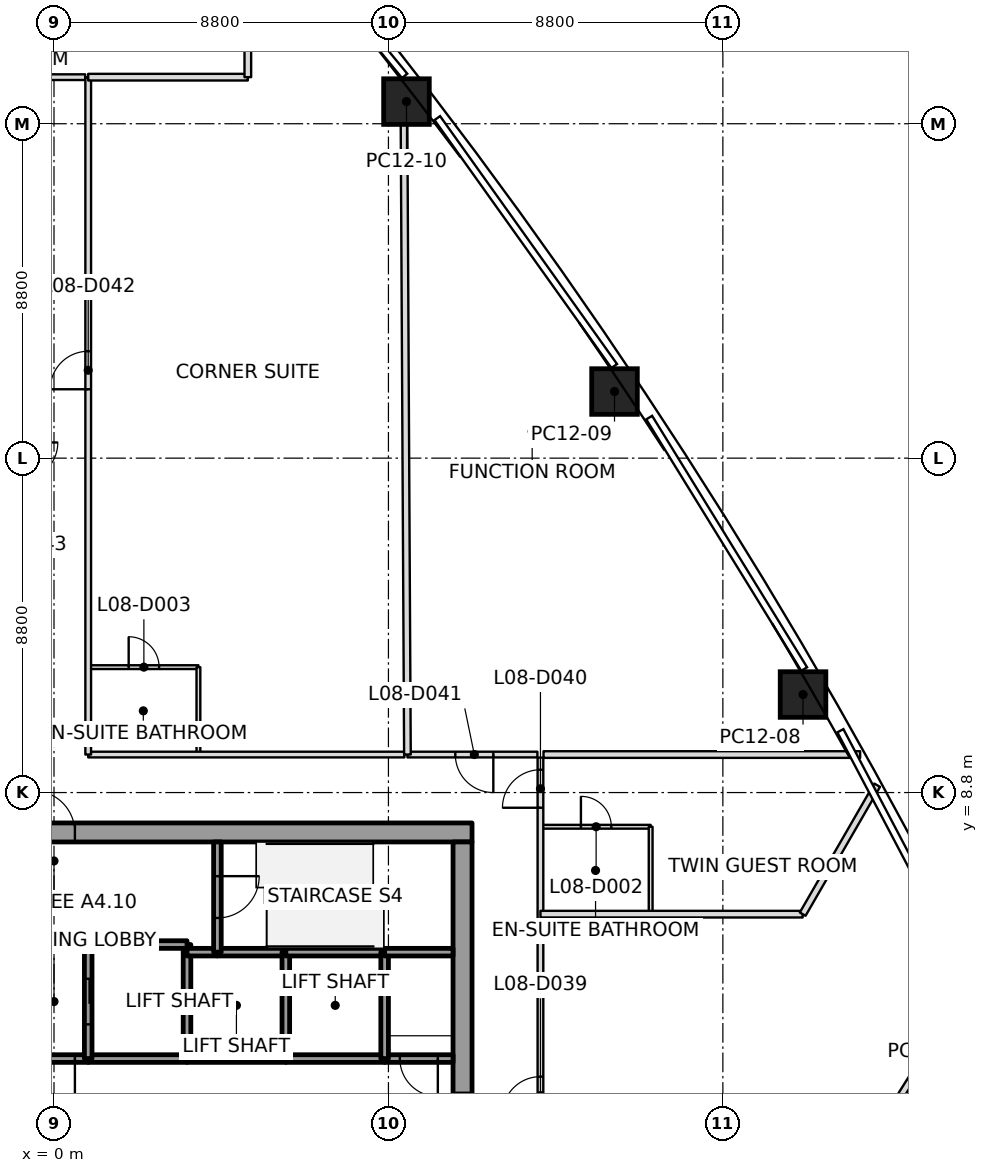
"""IFC4 building model, lengths in metres.
Left out: names, types, materials, properties, quantities, classifications, styles, units other than length and angle.
Written with IfcOpenShell. Run it as: python <this file> out.ifc"""

import sys

from ifc_helpers import new_model, si_unit, direction, frame, frame_2d, origin, origin_2d, place, context, subcontext, project, spatial, rectangle, extrude, element, fill, save


model = new_model("IFC4")
c1 = context("Model", 3, precision=1e-05, world=origin(), true_north=direction((0.0, 1.0)))
c2 = subcontext(c1, "Body", "Model", "MODEL_VIEW")
j1 = project(units=[si_unit("LENGTHUNIT", "METRE"), si_unit("PLANEANGLEUNIT", "RADIAN")], contexts=[c1])
p1 = place(None, origin())
s1 = spatial("IfcSite", under=j1, at=p1, CompositionType="ELEMENT")
p2 = place(p1, origin())
s2 = spatial("IfcBuilding", under=s1, at=p2, CompositionType="ELEMENT")
p3 = place(p2, frame((0.0, 0.0, 51.7)))
s3 = spatial("IfcBuildingStorey", under=s2, at=p3, CompositionType="ELEMENT", Elevation=51.7)
p4 = place(p3, frame((19.709, 11.379, 0.0), z_axis=(-0.010688725148, -0.006202099777, 0.999923639641), x_axis=(-0.499971436973, 0.8660418936, 2.7223042e-05)))
e1 = element("IfcColumn", 1, at=p4, inside=s3, PredefinedType="COLUMN", context=c2, shape_type="SweptSolid", body=[
    extrude(rectangle(XDim=1.2, YDim=1.2, at=origin_2d()), origin(), (0.0, 0.0, 1.0), 3.7),
])
p5 = place(p3, frame((14.749, 19.353, 0.0), z_axis=(-0.005674011074, -0.014448935178, 0.999879509676), x_axis=(-0.555902266829, 0.831200472954, 0.008856833298)))
e2 = element("IfcColumn", 2, at=p5, inside=s3, PredefinedType="COLUMN", context=c2, shape_type="SweptSolid", body=[
    extrude(rectangle(XDim=1.2, YDim=1.2, at=origin_2d()), origin(), (0.0, 0.0, 1.0), 3.7),
])
p6 = place(p3, frame((9.275, 26.982, 0.0), z_axis=(-0.000197904668, -0.022429195703, 0.999748414359), x_axis=(-0.609410619904, 0.792658016882, 0.017662520216)))
e3 = element("IfcColumn", 3, at=p6, inside=s3, PredefinedType="COLUMN", context=c2, shape_type="SweptSolid", body=[
    extrude(rectangle(XDim=1.2, YDim=1.2, at=origin_2d()), origin(), (0.0, 0.0, 1.0), 3.701),
])
p7 = place(p3, frame((-11.0, 7.75, 0.0), z_axis=(0.0, 0.0, 1.0), x_axis=(1.0, 0.0, 0.0)))
e4 = element("IfcWall", 4, at=p7, inside=s3, PredefinedType="SHEAR", context=c2, shape_type="SweptSolid", body=[
    extrude(rectangle(XDim=22.0, YDim=0.5, at=frame_2d((11.0, 0.0))), origin(), (0.0, 0.0, 1.0), 3.7),
])
p8 = place(p7, frame((10.45, 0.0, 0.0)))
e5 = element("IfcOpeningElement", 5, at=p8, cuts=e4, PredefinedType="OPENING", context=c2, shape_type="SweptSolid", body=[
    extrude(rectangle(XDim=1.1, YDim=2.1, at=frame_2d((0.55, 1.05))), frame((0.0, 0.25, 0.0), z_axis=(0.0, -1.0, 0.0), x_axis=(1.0, 0.0, 0.0)), (0.0, 0.0, 1.0), 0.5),
])
p9 = place(p3, frame((10.75, -7.5, 0.0), z_axis=(0.0, 0.0, 1.0), x_axis=(0.0, 1.0, 0.0)))
e6 = element("IfcWall", 6, at=p9, inside=s3, PredefinedType="SHEAR", context=c2, shape_type="SweptSolid", body=[
    extrude(rectangle(XDim=15.0, YDim=0.5, at=frame_2d((7.5, 0.0))), origin(), (0.0, 0.0, 1.0), 3.7),
])
p10 = place(p9, frame((6.6, 0.0, 0.0)))
e7 = element("IfcOpeningElement", 7, at=p10, cuts=e6, PredefinedType="OPENING", context=c2, shape_type="SweptSolid", body=[
    extrude(rectangle(XDim=1.8, YDim=2.1, at=frame_2d((0.9, 1.05))), frame((0.0, 0.25, 0.0), z_axis=(0.0, -1.0, 0.0), x_axis=(1.0, 0.0, 0.0)), (0.0, 0.0, 1.0), 0.5),
])
p11 = place(p3, frame((0.9, 1.8, 0.0), z_axis=(0.0, 0.0, 1.0), x_axis=(-1.0, 0.0, 0.0)))
e8 = element("IfcWall", 8, at=p11, inside=s3, PredefinedType="SOLIDWALL", context=c2, shape_type="SweptSolid", body=[
    extrude(rectangle(XDim=1.8, YDim=0.2, at=frame_2d((0.9, 0.0))), origin(), (0.0, 0.0, 1.0), 3.55),
])
p12 = place(p11, frame((0.35, 0.0, 0.0)))
e9 = element("IfcOpeningElement", 9, at=p12, cuts=e8, PredefinedType="OPENING", context=c2, shape_type="SweptSolid", body=[
    extrude(rectangle(XDim=1.1, YDim=2.1, at=frame_2d((0.55, 1.05))), frame((0.0, 0.1, 0.0), z_axis=(0.0, -1.0, 0.0), x_axis=(1.0, 0.0, 0.0)), (0.0, 0.0, 1.0), 0.2),
])
p13 = place(p3, frame((3.5, 1.8, 0.0), z_axis=(0.0, 0.0, 1.0), x_axis=(-1.0, 0.0, 0.0)))
e10 = element("IfcWall", 10, at=p13, inside=s3, PredefinedType="SOLIDWALL", context=c2, shape_type="SweptSolid", body=[
    extrude(rectangle(XDim=2.6, YDim=0.2, at=frame_2d((1.3, 0.0))), origin(), (0.0, 0.0, 1.0), 3.55),
])
p14 = place(p3, frame((3.5, 4.6, 0.0), z_axis=(0.0, 0.0, 1.0), x_axis=(0.0, 1.0, 0.0)))
e11 = element("IfcWall", 11, at=p14, inside=s3, PredefinedType="SOLIDWALL", context=c2, shape_type="SweptSolid", body=[
    extrude(rectangle(XDim=0.2, YDim=0.2, at=frame_2d((0.1, 0.0))), origin(), (0.0, 0.0, 1.0), 3.55),
])
p15 = place(p3, frame((3.5, 4.8, 0.0), z_axis=(0.0, 0.0, 1.0), x_axis=(-1.0, 0.0, 0.0)))
e12 = element("IfcWall", 12, at=p15, inside=s3, PredefinedType="SOLIDWALL", context=c2, shape_type="SweptSolid", body=[
    extrude(rectangle(XDim=2.6, YDim=0.2, at=frame_2d((1.3, 0.0))), origin(), (0.0, 0.0, 1.0), 3.55),
])
p16 = place(p3, frame((0.9, 4.8, 0.0), z_axis=(0.0, 0.0, 1.0), x_axis=(0.0, -1.0, 0.0)))
e13 = element("IfcWall", 13, at=p16, inside=s3, PredefinedType="SOLIDWALL", context=c2, shape_type="SweptSolid", body=[
    extrude(rectangle(XDim=3.0, YDim=0.2, at=frame_2d((1.5, 0.0))), origin(), (0.0, 0.0, 1.0), 3.55),
])
p17 = place(p16, frame((0.9, 0.0, 0.0)))
e14 = element("IfcOpeningElement", 14, at=p17, cuts=e13, PredefinedType="OPENING", context=c2, shape_type="SweptSolid", body=[
    extrude(rectangle(XDim=1.2, YDim=2.1, at=frame_2d((0.6, 1.05))), frame((0.0, 0.1, 0.0), z_axis=(0.0, -1.0, 0.0), x_axis=(1.0, 0.0, 0.0)), (0.0, 0.0, 1.0), 0.2),
])
p18 = place(p3, frame((6.1, 1.8, 0.0), z_axis=(0.0, 0.0, 1.0), x_axis=(-1.0, 0.0, 0.0)))
e15 = element("IfcWall", 15, at=p18, inside=s3, PredefinedType="SOLIDWALL", context=c2, shape_type="SweptSolid", body=[
    extrude(rectangle(XDim=2.6, YDim=0.2, at=frame_2d((1.3, 0.0))), origin(), (0.0, 0.0, 1.0), 3.55),
])
p19 = place(p3, frame((3.5, 1.8, 0.0), z_axis=(0.0, 0.0, 1.0), x_axis=(0.0, 1.0, 0.0)))
e16 = element("IfcWall", 16, at=p19, inside=s3, PredefinedType="SOLIDWALL", context=c2, shape_type="SweptSolid", body=[
    extrude(rectangle(XDim=2.8, YDim=0.2, at=frame_2d((1.4, 0.0))), origin(), (0.0, 0.0, 1.0), 3.55),
])
p20 = place(p3, frame((4.3, 4.6, 0.0), z_axis=(0.0, 0.0, 1.0), x_axis=(-1.0, 0.0, 0.0)))
e17 = element("IfcWall", 17, at=p20, inside=s3, PredefinedType="SOLIDWALL", context=c2, shape_type="SweptSolid", body=[
    extrude(rectangle(XDim=0.8, YDim=0.2, at=frame_2d((0.4, 0.0))), origin(), (0.0, 0.0, 1.0), 3.55),
])
p21 = place(p3, frame((6.1, 4.6, 0.0), z_axis=(0.0, 0.0, 1.0), x_axis=(-1.0, 0.0, 0.0)))
e18 = element("IfcWall", 18, at=p21, inside=s3, PredefinedType="SOLIDWALL", context=c2, shape_type="SweptSolid", body=[
    extrude(rectangle(XDim=1.8, YDim=0.2, at=frame_2d((0.9, 0.0))), origin(), (0.0, 0.0, 1.0), 3.55),
])
p22 = place(p3, frame((4.3, 7.5, 0.0), z_axis=(0.0, 0.0, 1.0), x_axis=(0.0, -1.0, 0.0)))
e19 = element("IfcWall", 19, at=p22, inside=s3, PredefinedType="SOLIDWALL", context=c2, shape_type="SweptSolid", body=[
    extrude(rectangle(XDim=2.9, YDim=0.2, at=frame_2d((1.45, 0.0))), origin(), (0.0, 0.0, 1.0), 3.55),
])
p23 = place(p22, frame((0.9, 0.0, 0.0)))
e20 = element("IfcOpeningElement", 20, at=p23, cuts=e19, PredefinedType="OPENING", context=c2, shape_type="SweptSolid", body=[
    extrude(rectangle(XDim=1.1, YDim=2.1, at=frame_2d((0.55, 1.05))), frame((0.0, 0.1, 0.0), z_axis=(0.0, -1.0, 0.0), x_axis=(1.0, 0.0, 0.0)), (0.0, 0.0, 1.0), 0.2),
])
p24 = place(p3, frame((8.7, 1.8, 0.0), z_axis=(0.0, 0.0, 1.0), x_axis=(-1.0, 0.0, 0.0)))
e21 = element("IfcWall", 21, at=p24, inside=s3, PredefinedType="SOLIDWALL", context=c2, shape_type="SweptSolid", body=[
    extrude(rectangle(XDim=2.6, YDim=0.2, at=frame_2d((1.3, 0.0))), origin(), (0.0, 0.0, 1.0), 3.55),
])
p25 = place(p3, frame((6.1, 1.8, 0.0), z_axis=(0.0, 0.0, 1.0), x_axis=(0.0, 1.0, 0.0)))
e22 = element("IfcWall", 22, at=p25, inside=s3, PredefinedType="SOLIDWALL", context=c2, shape_type="SweptSolid", body=[
    extrude(rectangle(XDim=2.8, YDim=0.2, at=frame_2d((1.4, 0.0))), origin(), (0.0, 0.0, 1.0), 3.55),
])
p26 = place(p3, frame((8.7, 4.6, 0.0), z_axis=(0.0, 0.0, 1.0), x_axis=(-1.0, 0.0, 0.0)))
e23 = element("IfcWall", 23, at=p26, inside=s3, PredefinedType="SOLIDWALL", context=c2, shape_type="SweptSolid", body=[
    extrude(rectangle(XDim=2.6, YDim=0.2, at=frame_2d((1.3, 0.0))), origin(), (0.0, 0.0, 1.0), 3.55),
])
p27 = place(p3, frame((10.5, 1.8, 0.0), z_axis=(0.0, 0.0, 1.0), x_axis=(-1.0, 0.0, 0.0)))
e24 = element("IfcWall", 24, at=p27, inside=s3, PredefinedType="SOLIDWALL", context=c2, shape_type="SweptSolid", body=[
    extrude(rectangle(XDim=1.8, YDim=0.2, at=frame_2d((0.9, 0.0))), origin(), (0.0, 0.0, 1.0), 3.55),
])
p28 = place(p27, frame((0.4, 0.0, 0.0)))
e25 = element("IfcOpeningElement", 25, at=p28, cuts=e24, PredefinedType="OPENING", context=c2, shape_type="SweptSolid", body=[
    extrude(rectangle(XDim=1.0, YDim=2.1, at=frame_2d((0.5, 1.05))), frame((0.0, 0.1, 0.0), z_axis=(0.0, -1.0, 0.0), x_axis=(1.0, 0.0, 0.0)), (0.0, 0.0, 1.0), 0.2),
])
p29 = place(p3, frame((8.7, 4.6, 0.0), z_axis=(0.0, 0.0, 1.0), x_axis=(0.0, -1.0, 0.0)))
e26 = element("IfcWall", 26, at=p29, inside=s3, PredefinedType="SOLIDWALL", context=c2, shape_type="SweptSolid", body=[
    extrude(rectangle(XDim=2.8, YDim=0.2, at=frame_2d((1.4, 0.0))), origin(), (0.0, 0.0, 1.0), 3.55),
])
p30 = place(p3, frame((10.5, 4.6, 0.0), z_axis=(0.0, 0.0, 1.0), x_axis=(-1.0, 0.0, 0.0)))
e27 = element("IfcWall", 27, at=p30, inside=s3, PredefinedType="SOLIDWALL", context=c2, shape_type="SweptSolid", body=[
    extrude(rectangle(XDim=1.8, YDim=0.2, at=frame_2d((0.9, 0.0))), origin(), (0.0, 0.0, 1.0), 3.55),
])
p31 = place(p3, frame((0.9, 27.625, 0.0), z_axis=(0.0, 0.0, 1.0), x_axis=(1.0, 0.0, 0.0)))
e28 = element("IfcWall", 28, at=p31, inside=s3, PredefinedType="PARTITIONING", context=c2, shape_type="SweptSolid", body=[
    extrude(rectangle(XDim=4.2, YDim=0.175, at=frame_2d((2.1, 0.0))), origin(), (0.0, 0.0, 1.0), 3.15),
])
p32 = place(p3, frame((5.1, 27.625, 0.0), z_axis=(0.0, 0.0, 1.0), x_axis=(0.0, 1.0, 0.0)))
e29 = element("IfcWall", 29, at=p32, inside=s3, PredefinedType="PARTITIONING", context=c2, shape_type="SweptSolid", body=[
    extrude(rectangle(XDim=5.351, YDim=0.175, at=frame_2d((2.675, 0.0))), origin(), (0.0, 0.0, 1.0), 2.934),
])
p33 = place(p3, frame((9.204, 27.586, 0.0), z_axis=(0.0, 0.0, 1.0), x_axis=(0.00539449399, -0.999985449611, 0.0)))
e30 = element("IfcWall", 30, at=p33, inside=s3, PredefinedType="PARTITIONING", context=c2, shape_type="SweptSolid", body=[
    extrude(rectangle(XDim=17.786, YDim=0.175, at=frame_2d((8.893, 0.0))), origin(), (0.0, 0.0, 1.0), 2.947),
])
p34 = place(p3, frame((12.8, 5.6, 0.0), z_axis=(0.0, 0.0, 1.0), x_axis=(1.0, 0.0, 0.0)))
e31 = element("IfcWall", 31, at=p34, inside=s3, PredefinedType="PARTITIONING", context=c2, shape_type="SweptSolid", body=[
    extrude(rectangle(XDim=6.9, YDim=0.175, at=frame_2d((3.45, 0.0))), origin(), (0.0, 0.0, 1.0), 3.093),
])
p35 = place(p3, frame((19.7, 5.6, 0.0), z_axis=(0.0, 0.0, 1.0), x_axis=(0.500038841519, 0.866002977462, 0.0)))
e32 = element("IfcWall", 32, at=p35, inside=s3, PredefinedType="PARTITIONING", context=c2, shape_type="SweptSolid", body=[
    extrude(rectangle(XDim=3.919, YDim=0.175, at=frame_2d((1.959, 0.0))), origin(), (0.0, 0.0, 1.0), 2.934),
])
p36 = place(p3, frame((12.88, 9.8, 0.0), z_axis=(0.0, 0.0, 1.0), x_axis=(1.0, 0.0, 0.0)))
e33 = element("IfcWall", 33, at=p36, inside=s3, PredefinedType="PARTITIONING", context=c2, shape_type="SweptSolid", body=[
    extrude(rectangle(XDim=8.332, YDim=0.175, at=frame_2d((4.166, 0.0))), origin(), (0.0, 0.0, 1.0), 2.934),
])
p37 = place(p3, frame((24.12, 3.739, 0.0), z_axis=(0.0, 0.0, 1.0), x_axis=(-0.533199701386, -0.845989407996, 0.0)))
e34 = element("IfcWall", 34, at=p37, inside=s3, PredefinedType="PARTITIONING", context=c2, shape_type="SweptSolid", body=[
    extrude(rectangle(XDim=14.408, YDim=0.175, at=frame_2d((7.204, 0.0))), origin(), (0.0, 0.0, 1.0), 2.947),
])
p38 = place(p3, frame((0.82, 27.625, 0.0), z_axis=(0.0, 0.0, 1.0), x_axis=(-1.0, 0.0, 0.0)))
e35 = element("IfcWall", 35, at=p38, inside=s3, PredefinedType="PARTITIONING", context=c2, shape_type="SweptSolid", body=[
    extrude(rectangle(XDim=1.64, YDim=0.15, at=frame_2d((0.82, 0.0))), origin(), (0.0, 0.0, 1.0), 2.797),
])
p39 = place(p3, frame((9.22, 9.8, 0.0), z_axis=(0.0, 0.0, 1.0), x_axis=(-1.0, 0.0, 0.0)))
e36 = element("IfcWall", 36, at=p39, inside=s3, PredefinedType="PARTITIONING", context=c2, shape_type="SweptSolid", body=[
    extrude(rectangle(XDim=8.32, YDim=0.15, at=frame_2d((4.16, 0.0))), origin(), (0.0, 0.0, 1.0), 2.947),
])
p40 = place(p3, frame((0.9, 9.8, 0.0), z_axis=(0.0, 0.0, 1.0), x_axis=(0.0, 1.0, 0.0)))
e37 = element("IfcWall", 37, at=p40, inside=s3, PredefinedType="PARTITIONING", context=c2, shape_type="SweptSolid", body=[
    extrude(rectangle(XDim=17.825, YDim=0.15, at=frame_2d((8.913, 0.0))), origin(), (0.0, 0.0, 1.0), 2.947),
])
p41 = place(p40, frame((9.613, 0.0, 0.0)))
e38 = element("IfcOpeningElement", 38, at=p41, cuts=e37, PredefinedType="OPENING", context=c2, shape_type="SweptSolid", body=[
    extrude(rectangle(XDim=1.0, YDim=2.1, at=frame_2d((0.5, 1.05))), frame((0.0, 0.075, 0.0), z_axis=(0.0, -1.0, 0.0), x_axis=(1.0, 0.0, 0.0)), (0.0, 0.0, 1.0), 0.15),
])
p42 = place(p3, frame((12.72, 9.8, 0.0), z_axis=(0.0, 0.0, 1.0), x_axis=(-1.0, 0.0, 0.0)))
e39 = element("IfcWall", 39, at=p42, inside=s3, PredefinedType="PARTITIONING", context=c2, shape_type="SweptSolid", body=[
    extrude(rectangle(XDim=3.42, YDim=0.15, at=frame_2d((1.71, 0.0))), origin(), (0.0, 0.0, 1.0), 3.017),
])
p43 = place(p42, frame((1.16, 0.0, 0.0)))
e40 = element("IfcOpeningElement", 40, at=p43, cuts=e39, PredefinedType="OPENING", context=c2, shape_type="SweptSolid", body=[
    extrude(rectangle(XDim=1.0, YDim=2.1, at=frame_2d((0.5, 1.05))), frame((0.0, 0.075, 0.0), z_axis=(0.0, -1.0, 0.0), x_axis=(1.0, 0.0, 0.0)), (0.0, 0.0, 1.0), 0.15),
])
p44 = place(p3, frame((12.8, -6.351, 0.0), z_axis=(0.0, 0.0, 1.0), x_axis=(0.0, 1.0, 0.0)))
e41 = element("IfcWall", 41, at=p44, inside=s3, PredefinedType="PARTITIONING", context=c2, shape_type="SweptSolid", body=[
    extrude(rectangle(XDim=16.071, YDim=0.15, at=frame_2d((8.035, 0.0))), origin(), (0.0, 0.0, 1.0), 3.017),
])
p45 = place(p44, frame((6.676, 0.0, 0.0)))
e42 = element("IfcOpeningElement", 42, at=p45, cuts=e41, PredefinedType="OPENING", context=c2, shape_type="SweptSolid", body=[
    extrude(rectangle(XDim=1.0, YDim=2.1, at=frame_2d((0.5, 1.05))), frame((0.0, 0.075, 0.0), z_axis=(0.0, -1.0, 0.0), x_axis=(1.0, 0.0, 0.0)), (0.0, 0.0, 1.0), 0.15),
])
p46 = place(p44, frame((14.751, 0.0, 0.0)))
e43 = element("IfcOpeningElement", 43, at=p46, cuts=e41, PredefinedType="OPENING", context=c2, shape_type="SweptSolid", body=[
    extrude(rectangle(XDim=1.0, YDim=2.1, at=frame_2d((0.5, 1.05))), frame((0.0, 0.075, 0.0), z_axis=(0.0, -1.0, 0.0), x_axis=(1.0, 0.0, 0.0)), (0.0, 0.0, 1.0), 0.15),
])
p47 = place(p3, frame((0.93, 12.1, 0.0), z_axis=(0.0, 0.0, 1.0), x_axis=(1.0, 0.0, 0.0)))
e44 = element("IfcWall", 44, at=p47, inside=s3, PredefinedType="PARTITIONING", context=c2, shape_type="SweptSolid", body=[
    extrude(rectangle(XDim=2.87, YDim=0.1, at=frame_2d((1.435, 0.0))), origin(), (0.0, 0.0, 1.0), 3.15),
])
p48 = place(p47, frame((1.035, 0.0, 0.0)))
e45 = element("IfcOpeningElement", 45, at=p48, cuts=e44, PredefinedType="OPENING", context=c2, shape_type="SweptSolid", body=[
    extrude(rectangle(XDim=0.8, YDim=2.1, at=frame_2d((0.4, 1.05))), frame((0.0, 0.05, 0.0), z_axis=(0.0, -1.0, 0.0), x_axis=(1.0, 0.0, 0.0)), (0.0, 0.0, 1.0), 0.1),
])
p49 = place(p3, frame((3.8, 12.1, 0.0), z_axis=(0.0, 0.0, 1.0), x_axis=(0.0, -1.0, 0.0)))
e46 = element("IfcWall", 46, at=p49, inside=s3, PredefinedType="PARTITIONING", context=c2, shape_type="SweptSolid", body=[
    extrude(rectangle(XDim=2.27, YDim=0.1, at=frame_2d((1.135, 0.0))), origin(), (0.0, 0.0, 1.0), 3.15),
])
p50 = place(p3, frame((12.83, 7.9, 0.0), z_axis=(0.0, 0.0, 1.0), x_axis=(1.0, 0.0, 0.0)))
e47 = element("IfcWall", 47, at=p50, inside=s3, PredefinedType="PARTITIONING", context=c2, shape_type="SweptSolid", body=[
    extrude(rectangle(XDim=2.87, YDim=0.1, at=frame_2d((1.435, 0.0))), origin(), (0.0, 0.0, 1.0), 3.15),
])
p51 = place(p50, frame((1.035, 0.0, 0.0)))
e48 = element("IfcOpeningElement", 48, at=p51, cuts=e47, PredefinedType="OPENING", context=c2, shape_type="SweptSolid", body=[
    extrude(rectangle(XDim=0.8, YDim=2.1, at=frame_2d((0.4, 1.05))), frame((0.0, 0.05, 0.0), z_axis=(0.0, -1.0, 0.0), x_axis=(1.0, 0.0, 0.0)), (0.0, 0.0, 1.0), 0.1),
])
p52 = place(p3, frame((15.7, 7.9, 0.0), z_axis=(0.0, 0.0, 1.0), x_axis=(0.0, -1.0, 0.0)))
e49 = element("IfcWall", 49, at=p52, inside=s3, PredefinedType="PARTITIONING", context=c2, shape_type="SweptSolid", body=[
    extrude(rectangle(XDim=2.27, YDim=0.1, at=frame_2d((1.135, 0.0))), origin(), (0.0, 0.0, 1.0), 3.15),
])
p53 = place(p45, origin())
e50 = element("IfcDoor", 50, at=p53, inside=s3, OperationType="SINGLE_SWING_LEFT", PredefinedType="DOOR", context=c2, shape_type="SweptSolid", body=[
    extrude(rectangle(XDim=1.0, YDim=2.1, at=frame_2d((0.5, 1.05))), frame((0.0, 0.025, 0.0), z_axis=(0.0, -1.0, 0.0), x_axis=(1.0, 0.0, 0.0)), (0.0, 0.0, 1.0), 0.05),
])
fill(e42, e50)
p54 = place(p46, origin())
e51 = element("IfcDoor", 51, at=p54, inside=s3, OperationType="SINGLE_SWING_LEFT", PredefinedType="DOOR", context=c2, shape_type="SweptSolid", body=[
    extrude(rectangle(XDim=1.0, YDim=2.1, at=frame_2d((0.5, 1.05))), frame((0.0, 0.025, 0.0), z_axis=(0.0, -1.0, 0.0), x_axis=(1.0, 0.0, 0.0)), (0.0, 0.0, 1.0), 0.05),
])
fill(e43, e51)
p55 = place(p51, origin())
e52 = element("IfcDoor", 52, at=p55, inside=s3, OperationType="SINGLE_SWING_RIGHT", PredefinedType="DOOR", context=c2, shape_type="SweptSolid", body=[
    extrude(rectangle(XDim=0.8, YDim=2.1, at=frame_2d((0.4, 1.05))), frame((0.0, 0.025, 0.0), z_axis=(0.0, -1.0, 0.0), x_axis=(1.0, 0.0, 0.0)), (0.0, 0.0, 1.0), 0.05),
])
fill(e48, e52)
p56 = place(p43, origin())
e53 = element("IfcDoor", 53, at=p56, inside=s3, OperationType="SINGLE_SWING_RIGHT", PredefinedType="DOOR", context=c2, shape_type="SweptSolid", body=[
    extrude(rectangle(XDim=1.0, YDim=2.1, at=frame_2d((0.5, 1.05))), frame((0.0, 0.025, 0.0), z_axis=(0.0, -1.0, 0.0), x_axis=(1.0, 0.0, 0.0)), (0.0, 0.0, 1.0), 0.05),
])
fill(e40, e53)
p57 = place(p41, origin())
e54 = element("IfcDoor", 54, at=p57, inside=s3, OperationType="SINGLE_SWING_RIGHT", PredefinedType="DOOR", context=c2, shape_type="SweptSolid", body=[
    extrude(rectangle(XDim=1.0, YDim=2.1, at=frame_2d((0.5, 1.05))), frame((0.0, 0.025, 0.0), z_axis=(0.0, -1.0, 0.0), x_axis=(1.0, 0.0, 0.0)), (0.0, 0.0, 1.0), 0.05),
])
fill(e38, e54)
p58 = place(p48, origin())
e55 = element("IfcDoor", 55, at=p58, inside=s3, OperationType="SINGLE_SWING_RIGHT", PredefinedType="DOOR", context=c2, shape_type="SweptSolid", body=[
    extrude(rectangle(XDim=0.8, YDim=2.1, at=frame_2d((0.4, 1.05))), frame((0.0, 0.025, 0.0), z_axis=(0.0, -1.0, 0.0), x_axis=(1.0, 0.0, 0.0)), (0.0, 0.0, 1.0), 0.05),
])
fill(e45, e55)
p59 = place(p17, origin())
e56 = element("IfcDoor", 56, at=p59, inside=s3, OperationType="SLIDING_TO_LEFT", PredefinedType="DOOR", context=c2, shape_type="SweptSolid", body=[
    extrude(rectangle(XDim=1.2, YDim=2.1, at=frame_2d((0.6, 1.05))), frame((0.0, 0.025, 0.0), z_axis=(0.0, -1.0, 0.0), x_axis=(1.0, 0.0, 0.0)), (0.0, 0.0, 1.0), 0.05),
])
fill(e14, e56)
p60 = place(p12, origin())
e57 = element("IfcDoor", 57, at=p60, inside=s3, OperationType="SINGLE_SWING_RIGHT", PredefinedType="DOOR", context=c2, shape_type="SweptSolid", body=[
    extrude(rectangle(XDim=1.1, YDim=2.1, at=frame_2d((0.55, 1.05))), frame((0.0, 0.025, 0.0), z_axis=(0.0, -1.0, 0.0), x_axis=(1.0, 0.0, 0.0)), (0.0, 0.0, 1.0), 0.05),
])
fill(e9, e57)
p61 = place(p28, origin())
e58 = element("IfcDoor", 58, at=p61, inside=s3, OperationType="SINGLE_SWING_RIGHT", PredefinedType="DOOR", context=c2, shape_type="SweptSolid", body=[
    extrude(rectangle(XDim=1.0, YDim=2.1, at=frame_2d((0.5, 1.05))), frame((0.0, 0.025, 0.0), z_axis=(0.0, -1.0, 0.0), x_axis=(1.0, 0.0, 0.0)), (0.0, 0.0, 1.0), 0.05),
])
fill(e25, e58)
p62 = place(p23, origin())
e59 = element("IfcDoor", 59, at=p62, inside=s3, OperationType="SINGLE_SWING_LEFT", PredefinedType="DOOR", context=c2, shape_type="SweptSolid", body=[
    extrude(rectangle(XDim=1.1, YDim=2.1, at=frame_2d((0.55, 1.05))), frame((0.0, 0.025, 0.0), z_axis=(0.0, -1.0, 0.0), x_axis=(1.0, 0.0, 0.0)), (0.0, 0.0, 1.0), 0.05),
])
fill(e20, e59)
p63 = place(p10, origin())
e60 = element("IfcDoor", 60, at=p63, inside=s3, OperationType="DOUBLE_DOOR_SINGLE_SWING", PredefinedType="DOOR", context=c2, shape_type="SweptSolid", body=[
    extrude(rectangle(XDim=1.8, YDim=2.1, at=frame_2d((0.9, 1.05))), frame((0.0, 0.025, 0.0), z_axis=(0.0, -1.0, 0.0), x_axis=(1.0, 0.0, 0.0)), (0.0, 0.0, 1.0), 0.05),
])
fill(e7, e60)
p64 = place(p8, origin())
e61 = element("IfcDoor", 61, at=p64, inside=s3, OperationType="SINGLE_SWING_RIGHT", PredefinedType="DOOR", context=c2, shape_type="SweptSolid", body=[
    extrude(rectangle(XDim=1.1, YDim=2.1, at=frame_2d((0.55, 1.05))), frame((0.0, 0.025, 0.0), z_axis=(0.0, -1.0, 0.0), x_axis=(1.0, 0.0, 0.0)), (0.0, 0.0, 1.0), 0.05),
])
fill(e5, e61)
save(model, sys.argv[1])
